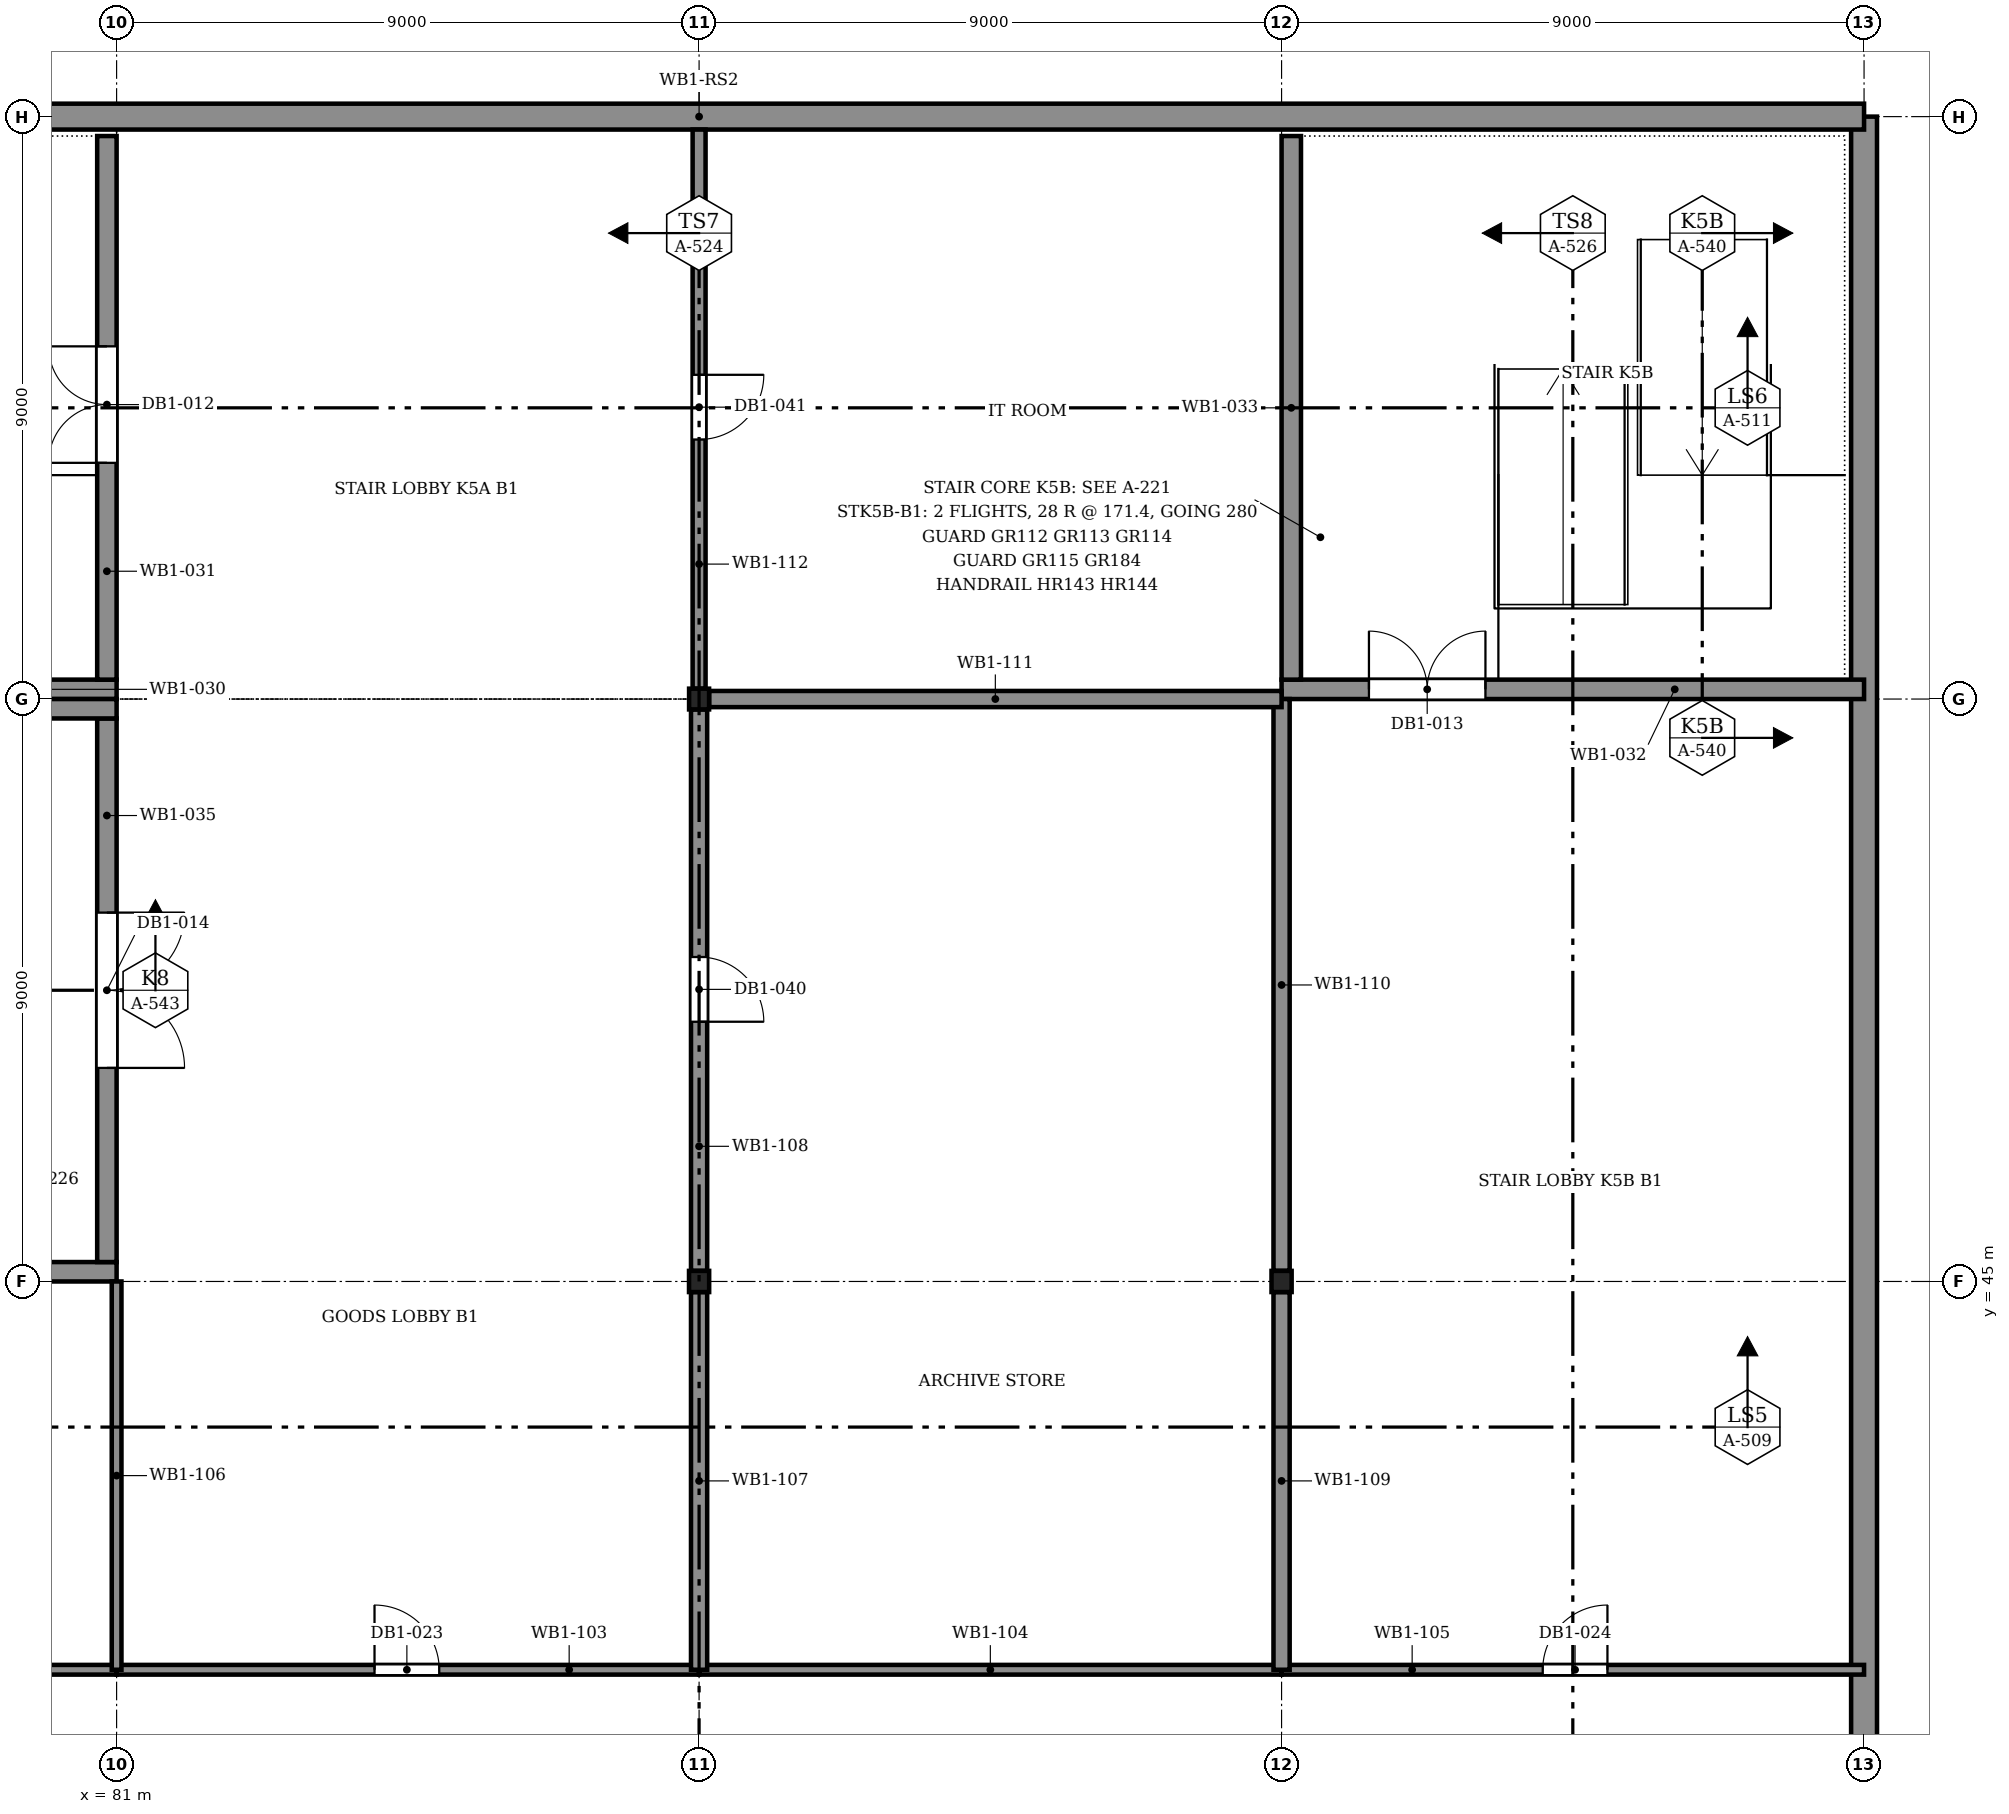
"""IFC4 building model, lengths in metres.
Left out: names, types, materials, properties, quantities, classifications, styles, units other than length and angle.
Written with IfcOpenShell. Run it as: python <this file> out.ifc"""

import sys

from ifc_helpers import new_model, si_unit, direction, frame, frame_2d, origin, origin_2d, place, context, subcontext, project, spatial, rectangle, i_section, extrude, element, fill, save


model = new_model("IFC4")
c1 = context("Model", 3, precision=1e-05, world=origin(), true_north=direction((0.0, 1.0)))
c2 = subcontext(c1, "Body", "Model", "MODEL_VIEW")
j1 = project(units=[si_unit("LENGTHUNIT", "METRE"), si_unit("PLANEANGLEUNIT", "RADIAN")], contexts=[c1])
p1 = place(None, origin())
s1 = spatial("IfcSite", under=j1, at=p1, CompositionType="ELEMENT")
p2 = place(p1, origin())
s2 = spatial("IfcBuilding", under=s1, at=p2, CompositionType="ELEMENT")
p3 = place(p2, frame((0.0, 0.0, -4.8)))
s3 = spatial("IfcBuildingStorey", under=s2, at=p3, CompositionType="ELEMENT", Elevation=-4.8)
p4 = place(p3, frame((108.0, 0.0, 0.0), z_axis=(0.0, 0.0, 1.0), x_axis=(0.0, 1.0, 0.0)))
e1 = element("IfcWall", 1, at=p4, inside=s3, PredefinedType="SOLIDWALL", context=c2, shape_type="SweptSolid", body=[
    extrude(rectangle(XDim=63.0, YDim=0.4, at=frame_2d((31.5, 0.0))), origin(), (0.0, 0.0, 1.0), 4.8),
])
p5 = place(p3, frame((72.0, 63.0, 0.0), z_axis=(0.0, 0.0, 1.0), x_axis=(1.0, 0.0, 0.0)))
e2 = element("IfcWall", 2, at=p5, inside=s3, PredefinedType="SOLIDWALL", context=c2, shape_type="SweptSolid", body=[
    extrude(rectangle(XDim=36.0, YDim=0.4, at=frame_2d((18.0, 0.0))), origin(), (0.0, 0.0, 1.0), 4.8),
])
for number, where, z_axis, x_axis in (
    (3, (90.0, 45.0, 0.0), (0.0, 0.0, 1.0), (1.0, 0.0, 0.0)),
    (4, (99.0, 45.0, 0.0), (0.0, 0.0, 1.0), (1.0, 0.0, 0.0)),
):
    element("IfcColumn", number, at=place(p3, frame(where, z_axis=z_axis, x_axis=x_axis)), inside=s3, PredefinedType="COLUMN", context=c2, shape_type="SweptSolid", body=[
        extrude(i_section(OverallWidth=0.311, OverallDepth=0.327, WebThickness=0.016, FlangeThickness=0.025, FilletRadius=0.017, at=origin_2d()), origin(), (0.0, 0.0, 1.0), 4.8),
    ])
p6 = place(p3, frame((90.0, 54.0, 0.0), z_axis=(0.0, 0.0, 1.0), x_axis=(1.0, 0.0, 0.0)))
e5 = element("IfcColumn", 5, at=p6, inside=s3, PredefinedType="COLUMN", context=c2, shape_type="SweptSolid", body=[
    extrude(i_section(OverallWidth=0.309, OverallDepth=0.321, WebThickness=0.014, FlangeThickness=0.022, FilletRadius=0.017, at=origin_2d()), origin(), (0.0, 0.0, 1.0), 4.8),
])
p7 = place(p3, frame((72.0, 54.15, 0.0), z_axis=(0.0, 0.0, 1.0), x_axis=(1.0, 0.0, 0.0)))
e6 = element("IfcWall", 6, at=p7, inside=s3, PredefinedType="SOLIDWALL", context=c2, shape_type="SweptSolid", body=[
    extrude(rectangle(XDim=9.0, YDim=0.3, at=frame_2d((4.5, 0.0))), origin(), (0.0, 0.0, 1.0), 4.8),
])
p8 = place(p3, frame((80.85, 54.3, 0.0), z_axis=(0.0, 0.0, 1.0), x_axis=(0.0, 1.0, 0.0)))
e7 = element("IfcWall", 7, at=p8, inside=s3, PredefinedType="SOLIDWALL", context=c2, shape_type="SweptSolid", body=[
    extrude(rectangle(XDim=8.4, YDim=0.3, at=frame_2d((4.2, 0.0))), origin(), (0.0, 0.0, 1.0), 4.8),
])
p9 = place(p8, frame((3.35, 0.0, 0.0)))
e8 = element("IfcOpeningElement", 8, at=p9, cuts=e7, PredefinedType="OPENING", context=c2, shape_type="SweptSolid", body=[
    extrude(rectangle(XDim=1.8, YDim=2.1, at=frame_2d((0.9, 1.05))), frame((0.0, 0.16, 0.0), z_axis=(0.0, -1.0, 0.0), x_axis=(1.0, 0.0, 0.0)), (0.0, 0.0, 1.0), 0.32),
])
p10 = place(p3, frame((99.0, 54.15, 0.0), z_axis=(0.0, 0.0, 1.0), x_axis=(1.0, 0.0, 0.0)))
e9 = element("IfcWall", 9, at=p10, inside=s3, PredefinedType="SOLIDWALL", context=c2, shape_type="SweptSolid", body=[
    extrude(rectangle(XDim=9.0, YDim=0.3, at=frame_2d((4.5, 0.0))), origin(), (0.0, 0.0, 1.0), 4.8),
])
p11 = place(p10, frame((1.35, 0.0, 0.0)))
e10 = element("IfcOpeningElement", 10, at=p11, cuts=e9, PredefinedType="OPENING", context=c2, shape_type="SweptSolid", body=[
    extrude(rectangle(XDim=1.8, YDim=2.1, at=frame_2d((0.9, 1.05))), frame((0.0, 0.16, 0.0), z_axis=(0.0, -1.0, 0.0), x_axis=(1.0, 0.0, 0.0)), (0.0, 0.0, 1.0), 0.32),
])
p12 = place(p3, frame((99.15, 54.3, 0.0), z_axis=(0.0, 0.0, 1.0), x_axis=(0.0, 1.0, 0.0)))
e11 = element("IfcWall", 11, at=p12, inside=s3, PredefinedType="SOLIDWALL", context=c2, shape_type="SweptSolid", body=[
    extrude(rectangle(XDim=8.4, YDim=0.3, at=frame_2d((4.2, 0.0))), origin(), (0.0, 0.0, 1.0), 4.8),
])
p13 = place(p3, frame((72.0, 45.15, 0.0), z_axis=(0.0, 0.0, 1.0), x_axis=(1.0, 0.0, 0.0)))
e12 = element("IfcWall", 12, at=p13, inside=s3, PredefinedType="SOLIDWALL", context=c2, shape_type="SweptSolid", body=[
    extrude(rectangle(XDim=9.0, YDim=0.3, at=frame_2d((4.5, 0.0))), origin(), (0.0, 0.0, 1.0), 4.8),
])
p14 = place(p3, frame((80.85, 45.3, 0.0), z_axis=(0.0, 0.0, 1.0), x_axis=(0.0, 1.0, 0.0)))
e13 = element("IfcWall", 13, at=p14, inside=s3, PredefinedType="SOLIDWALL", context=c2, shape_type="SweptSolid", body=[
    extrude(rectangle(XDim=8.4, YDim=0.3, at=frame_2d((4.2, 0.0))), origin(), (0.0, 0.0, 1.0), 4.8),
])
p15 = place(p14, frame((3.0, 0.0, 0.0)))
e14 = element("IfcOpeningElement", 14, at=p15, cuts=e13, PredefinedType="OPENING", context=c2, shape_type="SweptSolid", body=[
    extrude(rectangle(XDim=2.4, YDim=2.4, at=frame_2d((1.2, 1.2))), frame((0.0, 0.16, 0.0), z_axis=(0.0, -1.0, 0.0), x_axis=(1.0, 0.0, 0.0)), (0.0, 0.0, 1.0), 0.32),
])
p16 = place(p3, frame((72.0, 53.85, 0.0), z_axis=(0.0, 0.0, 1.0), x_axis=(1.0, 0.0, 0.0)))
e15 = element("IfcWall", 15, at=p16, inside=s3, PredefinedType="SOLIDWALL", context=c2, shape_type="SweptSolid", body=[
    extrude(rectangle(XDim=9.0, YDim=0.3, at=frame_2d((4.5, 0.0))), origin(), (0.0, 0.0, 1.0), 4.8),
])
p17 = place(p3, frame((72.0, 39.0, 0.0), z_axis=(0.0, 0.0, 1.0), x_axis=(1.0, 0.0, 0.0)))
e16 = element("IfcWall", 16, at=p17, inside=s3, PredefinedType="PARTITIONING", context=c2, shape_type="SweptSolid", body=[
    extrude(rectangle(XDim=9.0, YDim=0.15, at=frame_2d((4.5, 0.0))), origin(), (0.0, 0.0, 1.0), 3.758),
])
p18 = place(p17, frame((3.985, 0.0, 0.0)))
e17 = element("IfcOpeningElement", 17, at=p18, cuts=e16, PredefinedType="OPENING", context=c2, shape_type="SweptSolid", body=[
    extrude(rectangle(XDim=1.0, YDim=2.1, at=frame_2d((0.5, 1.05))), frame((0.0, 0.085, 0.0), z_axis=(0.0, -1.0, 0.0), x_axis=(1.0, 0.0, 0.0)), (0.0, 0.0, 1.0), 0.17),
])
p19 = place(p3, frame((81.0, 39.0, 0.0), z_axis=(0.0, 0.0, 1.0), x_axis=(1.0, 0.0, 0.0)))
e18 = element("IfcWall", 18, at=p19, inside=s3, PredefinedType="PARTITIONING", context=c2, shape_type="SweptSolid", body=[
    extrude(rectangle(XDim=9.0, YDim=0.15, at=frame_2d((4.5, 0.0))), origin(), (0.0, 0.0, 1.0), 3.758),
])
p20 = place(p19, frame((3.985, 0.0, 0.0)))
e19 = element("IfcOpeningElement", 19, at=p20, cuts=e18, PredefinedType="OPENING", context=c2, shape_type="SweptSolid", body=[
    extrude(rectangle(XDim=1.0, YDim=2.1, at=frame_2d((0.5, 1.05))), frame((0.0, 0.085, 0.0), z_axis=(0.0, -1.0, 0.0), x_axis=(1.0, 0.0, 0.0)), (0.0, 0.0, 1.0), 0.17),
])
p21 = place(p3, frame((90.0, 39.0, 0.0), z_axis=(0.0, 0.0, 1.0), x_axis=(1.0, 0.0, 0.0)))
e20 = element("IfcWall", 20, at=p21, inside=s3, PredefinedType="PARTITIONING", context=c2, shape_type="SweptSolid", body=[
    extrude(rectangle(XDim=9.0, YDim=0.15, at=frame_2d((4.5, 0.0))), origin(), (0.0, 0.0, 1.0), 3.758),
])
p22 = place(p3, frame((99.0, 39.0, 0.0), z_axis=(0.0, 0.0, 1.0), x_axis=(1.0, 0.0, 0.0)))
e21 = element("IfcWall", 21, at=p22, inside=s3, PredefinedType="PARTITIONING", context=c2, shape_type="SweptSolid", body=[
    extrude(rectangle(XDim=9.0, YDim=0.15, at=frame_2d((4.5, 0.0))), origin(), (0.0, 0.0, 1.0), 3.758),
])
p23 = place(p22, frame((4.035, 0.0, 0.0)))
e22 = element("IfcOpeningElement", 22, at=p23, cuts=e21, PredefinedType="OPENING", context=c2, shape_type="SweptSolid", body=[
    extrude(rectangle(XDim=1.0, YDim=2.1, at=frame_2d((0.5, 1.05))), frame((0.0, 0.085, 0.0), z_axis=(0.0, -1.0, 0.0), x_axis=(1.0, 0.0, 0.0)), (0.0, 0.0, 1.0), 0.17),
])
p24 = place(p3, frame((81.0, 39.0, 0.0), z_axis=(0.0, 0.0, 1.0), x_axis=(0.0, 1.0, 0.0)))
e23 = element("IfcWall", 23, at=p24, inside=s3, PredefinedType="PARTITIONING", context=c2, shape_type="SweptSolid", body=[
    extrude(rectangle(XDim=6.0, YDim=0.15, at=frame_2d((3.0, 0.0))), origin(), (0.0, 0.0, 1.0), 3.758),
])
p25 = place(p3, frame((90.0, 39.0, 0.0), z_axis=(0.0, 0.0, 1.0), x_axis=(0.0, 1.0, 0.0)))
e24 = element("IfcWall", 24, at=p25, inside=s3, PredefinedType="PARTITIONING", context=c2, shape_type="SweptSolid", body=[
    extrude(rectangle(XDim=5.836, YDim=0.25, at=frame_2d((2.918, 0.0))), origin(), (0.0, 0.0, 1.0), 3.758),
])
p26 = place(p3, frame((90.0, 45.164, 0.0), z_axis=(0.0, 0.0, 1.0), x_axis=(0.0, 1.0, 0.0)))
e25 = element("IfcWall", 25, at=p26, inside=s3, PredefinedType="PARTITIONING", context=c2, shape_type="SweptSolid", body=[
    extrude(rectangle(XDim=8.676, YDim=0.25, at=frame_2d((4.338, 0.0))), origin(), (0.0, 0.0, 1.0), 3.758),
])
p27 = place(p26, frame((3.85, 0.0, 0.0)))
e26 = element("IfcOpeningElement", 26, at=p27, cuts=e25, PredefinedType="OPENING", context=c2, shape_type="SweptSolid", body=[
    extrude(rectangle(XDim=1.0, YDim=2.1, at=frame_2d((0.5, 1.05))), frame((0.0, 0.135, 0.0), z_axis=(0.0, -1.0, 0.0), x_axis=(1.0, 0.0, 0.0)), (0.0, 0.0, 1.0), 0.27),
])
p28 = place(p3, frame((99.0, 39.0, 0.0), z_axis=(0.0, 0.0, 1.0), x_axis=(0.0, 1.0, 0.0)))
e27 = element("IfcWall", 27, at=p28, inside=s3, PredefinedType="PARTITIONING", context=c2, shape_type="SweptSolid", body=[
    extrude(rectangle(XDim=5.836, YDim=0.25, at=frame_2d((2.918, 0.0))), origin(), (0.0, 0.0, 1.0), 3.758),
])
p29 = place(p3, frame((99.0, 45.164, 0.0), z_axis=(0.0, 0.0, 1.0), x_axis=(0.0, 1.0, 0.0)))
e28 = element("IfcWall", 28, at=p29, inside=s3, PredefinedType="PARTITIONING", context=c2, shape_type="SweptSolid", body=[
    extrude(rectangle(XDim=8.836, YDim=0.25, at=frame_2d((4.418, 0.0))), origin(), (0.0, 0.0, 1.0), 3.758),
])
p30 = place(p3, frame((90.155, 54.0, 0.0), z_axis=(0.0, 0.0, 1.0), x_axis=(1.0, 0.0, 0.0)))
e29 = element("IfcWall", 29, at=p30, inside=s3, PredefinedType="PARTITIONING", context=c2, shape_type="SweptSolid", body=[
    extrude(rectangle(XDim=8.845, YDim=0.25, at=frame_2d((4.423, 0.0))), origin(), (0.0, 0.0, 1.0), 3.758),
])
p31 = place(p3, frame((90.0, 54.16, 0.0), z_axis=(0.0, 0.0, 1.0), x_axis=(0.0, 1.0, 0.0)))
e30 = element("IfcWall", 30, at=p31, inside=s3, PredefinedType="PARTITIONING", context=c2, shape_type="SweptSolid", body=[
    extrude(rectangle(XDim=8.64, YDim=0.2, at=frame_2d((4.32, 0.0))), origin(), (0.0, 0.0, 1.0), 3.758),
])
p32 = place(p31, frame((3.85, 0.0, 0.0)))
e31 = element("IfcOpeningElement", 31, at=p32, cuts=e30, PredefinedType="OPENING", context=c2, shape_type="SweptSolid", body=[
    extrude(rectangle(XDim=1.0, YDim=2.1, at=frame_2d((0.5, 1.05))), frame((0.0, 0.11, 0.0), z_axis=(0.0, -1.0, 0.0), x_axis=(1.0, 0.0, 0.0)), (0.0, 0.0, 1.0), 0.22),
])
p33 = place(p9, origin())
e32 = element("IfcDoor", 32, at=p33, inside=s3, OperationType="DOUBLE_DOOR_SINGLE_SWING", PredefinedType="DOOR", context=c2, shape_type="SweptSolid", body=[
    extrude(rectangle(XDim=1.8, YDim=2.1, at=frame_2d((0.9, 1.05))), frame((0.0, 0.025, 0.0), z_axis=(0.0, -1.0, 0.0), x_axis=(1.0, 0.0, 0.0)), (0.0, 0.0, 1.0), 0.05),
])
fill(e8, e32)
p34 = place(p11, origin())
e33 = element("IfcDoor", 33, at=p34, inside=s3, OperationType="DOUBLE_DOOR_SINGLE_SWING", PredefinedType="DOOR", context=c2, shape_type="SweptSolid", body=[
    extrude(rectangle(XDim=1.8, YDim=2.1, at=frame_2d((0.9, 1.05))), frame((0.0, 0.025, 0.0), z_axis=(0.0, -1.0, 0.0), x_axis=(1.0, 0.0, 0.0)), (0.0, 0.0, 1.0), 0.05),
])
fill(e10, e33)
p35 = place(p15, frame((2.4, 0.0, 0.0), z_axis=(0.0, 0.0, 1.0), x_axis=(-1.0, 0.0, 0.0)))
e34 = element("IfcDoor", 34, at=p35, inside=s3, OperationType="DOUBLE_DOOR_SINGLE_SWING", PredefinedType="DOOR", context=c2, shape_type="SweptSolid", body=[
    extrude(rectangle(XDim=2.4, YDim=2.4, at=frame_2d((1.2, 1.2))), frame((0.0, 0.025, 0.0), z_axis=(0.0, -1.0, 0.0), x_axis=(1.0, 0.0, 0.0)), (0.0, 0.0, 1.0), 0.05),
])
fill(e14, e34)
p36 = place(p20, origin())
e35 = element("IfcDoor", 35, at=p36, inside=s3, OperationType="SINGLE_SWING_RIGHT", PredefinedType="DOOR", context=c2, shape_type="SweptSolid", body=[
    extrude(rectangle(XDim=1.0, YDim=2.1, at=frame_2d((0.5, 1.05))), frame((0.0, 0.025, 0.0), z_axis=(0.0, -1.0, 0.0), x_axis=(1.0, 0.0, 0.0)), (0.0, 0.0, 1.0), 0.05),
])
fill(e19, e35)
p37 = place(p23, origin())
e36 = element("IfcDoor", 36, at=p37, inside=s3, OperationType="SINGLE_SWING_LEFT", PredefinedType="DOOR", context=c2, shape_type="SweptSolid", body=[
    extrude(rectangle(XDim=1.0, YDim=2.1, at=frame_2d((0.5, 1.05))), frame((0.0, 0.025, 0.0), z_axis=(0.0, -1.0, 0.0), x_axis=(1.0, 0.0, 0.0)), (0.0, 0.0, 1.0), 0.05),
])
fill(e22, e36)
p38 = place(p27, frame((1.0, 0.0, 0.0), z_axis=(0.0, 0.0, 1.0), x_axis=(-1.0, 0.0, 0.0)))
e37 = element("IfcDoor", 37, at=p38, inside=s3, OperationType="SINGLE_SWING_LEFT", PredefinedType="DOOR", context=c2, shape_type="SweptSolid", body=[
    extrude(rectangle(XDim=1.0, YDim=2.1, at=frame_2d((0.5, 1.05))), frame((0.0, 0.025, 0.0), z_axis=(0.0, -1.0, 0.0), x_axis=(1.0, 0.0, 0.0)), (0.0, 0.0, 1.0), 0.05),
])
fill(e26, e37)
p39 = place(p32, frame((1.0, 0.0, 0.0), z_axis=(0.0, 0.0, 1.0), x_axis=(-1.0, 0.0, 0.0)))
e38 = element("IfcDoor", 38, at=p39, inside=s3, OperationType="SINGLE_SWING_RIGHT", PredefinedType="DOOR", context=c2, shape_type="SweptSolid", body=[
    extrude(rectangle(XDim=1.0, YDim=2.1, at=frame_2d((0.5, 1.05))), frame((0.0, 0.025, 0.0), z_axis=(0.0, -1.0, 0.0), x_axis=(1.0, 0.0, 0.0)), (0.0, 0.0, 1.0), 0.05),
])
fill(e31, e38)
save(model, sys.argv[1])
